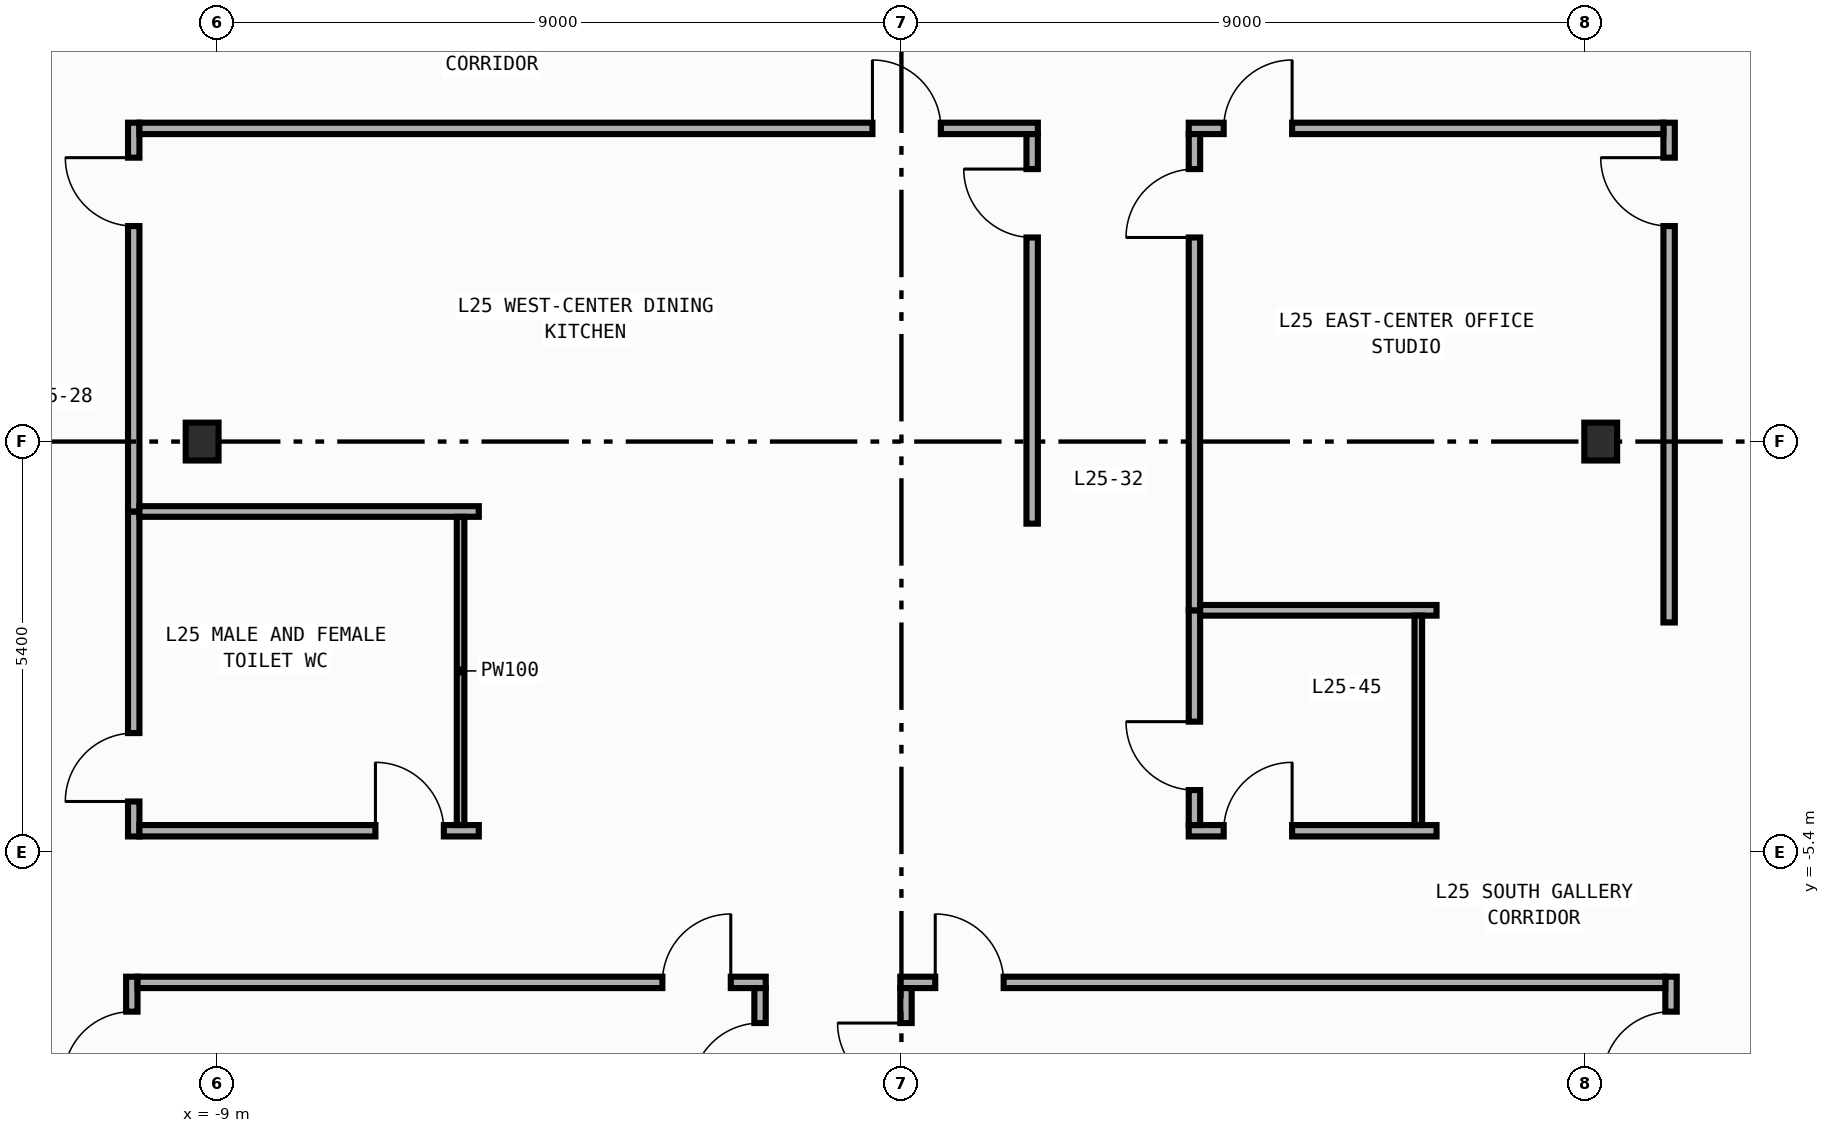
"""IFC4 building model, lengths in metres.
Left out: names, types, materials, properties, quantities, classifications, styles, units other than length and angle.
Written with IfcOpenShell. Run it as: python <this file> out.ifc"""

import sys

from ifc_helpers import new_model, si_unit, direction, frame, frame_2d, origin, origin_2d, place, context, subcontext, project, spatial, rectangle, i_section, extrude, element, fill, save


model = new_model("IFC4")
c1 = context("Model", 3, precision=1e-05, world=origin(), true_north=direction((0.0, 1.0)))
c2 = subcontext(c1, "Body", "Model", "MODEL_VIEW")
j1 = project(units=[si_unit("LENGTHUNIT", "METRE"), si_unit("PLANEANGLEUNIT", "RADIAN")], contexts=[c1])
p1 = place(None, origin())
s1 = spatial("IfcSite", under=j1, at=p1, CompositionType="ELEMENT")
p2 = place(p1, origin())
s2 = spatial("IfcBuilding", under=s1, at=p2, CompositionType="ELEMENT")
p3 = place(p2, frame((0.0, 0.0, 110.0)))
s3 = spatial("IfcBuildingStorey", under=s2, at=p3, CompositionType="ELEMENT", Elevation=110.0)
for number, where, z_axis, x_axis in (
    (1, (-9.2, 0.0, 0.0), (0.0, 0.0, 1.0), (1.0, 0.0, 0.0)),
    (2, (9.2, 0.0, 0.0), (0.0, 0.0, 1.0), (1.0, 0.0, 0.0)),
):
    element("IfcColumn", number, at=place(p3, frame(where, z_axis=z_axis, x_axis=x_axis)), inside=s3, PredefinedType="COLUMN", context=c2, shape_type="SweptSolid", body=[
        extrude(i_section(OverallWidth=0.432, OverallDepth=0.498, WebThickness=0.045, FlangeThickness=0.07, FilletRadius=0.022, at=origin_2d()), origin(), (0.0, 0.0, 1.0), 4.2),
    ])
p4 = place(p3, frame((-10.1, -5.195, 0.0), z_axis=(0.0, 0.0, 1.0), x_axis=(0.0, 1.0, 0.0)))
e3 = element("IfcWall", 3, at=p4, inside=s3, PredefinedType="PARTITIONING", context=c2, shape_type="SweptSolid", body=[
    extrude(rectangle(XDim=4.275, YDim=0.15, at=frame_2d((2.138, 0.0))), origin(), (0.0, 0.0, 1.0), 3.94),
])
p5 = place(p4, frame((0.46, 0.0, 0.0)))
e4 = element("IfcOpeningElement", 4, at=p5, cuts=e3, PredefinedType="OPENING", context=c2, shape_type="SweptSolid", body=[
    extrude(rectangle(XDim=0.9, YDim=2.15, at=frame_2d((0.45, 1.075))), frame((0.0, 0.085, 0.0), z_axis=(0.0, -1.0, 0.0), x_axis=(1.0, 0.0, 0.0)), (0.0, 0.0, 1.0), 0.17),
])
p6 = place(p3, frame((-10.1, -0.92, 0.0), z_axis=(0.0, 0.0, 1.0), x_axis=(0.0, 1.0, 0.0)))
e5 = element("IfcWall", 5, at=p6, inside=s3, PredefinedType="PARTITIONING", context=c2, shape_type="SweptSolid", body=[
    extrude(rectangle(XDim=5.115, YDim=0.15, at=frame_2d((2.558, 0.0))), origin(), (0.0, 0.0, 1.0), 3.94),
])
p7 = place(p6, frame((3.755, 0.0, 0.0)))
e6 = element("IfcOpeningElement", 6, at=p7, cuts=e5, PredefinedType="OPENING", context=c2, shape_type="SweptSolid", body=[
    extrude(rectangle(XDim=0.9, YDim=2.15, at=frame_2d((0.45, 1.075))), frame((0.0, 0.085, 0.0), z_axis=(0.0, -1.0, 0.0), x_axis=(1.0, 0.0, 0.0)), (0.0, 0.0, 1.0), 0.17),
])
p8 = place(p3, frame((-10.125, -12.44, 0.0), z_axis=(0.0, 0.0, 1.0), x_axis=(0.0, 1.0, 0.0)))
e7 = element("IfcWall", 7, at=p8, inside=s3, PredefinedType="PARTITIONING", context=c2, shape_type="SweptSolid", body=[
    extrude(rectangle(XDim=5.4, YDim=0.15, at=frame_2d((2.7, 0.0))), origin(), (0.0, 0.0, 1.0), 3.94),
])
p9 = place(p8, frame((4.04, 0.0, 0.0)))
e8 = element("IfcOpeningElement", 8, at=p9, cuts=e7, PredefinedType="OPENING", context=c2, shape_type="SweptSolid", body=[
    extrude(rectangle(XDim=0.9, YDim=2.15, at=frame_2d((0.45, 1.075))), frame((0.0, 0.085, 0.0), z_axis=(0.0, -1.0, 0.0), x_axis=(1.0, 0.0, 0.0)), (0.0, 0.0, 1.0), 0.17),
])
p10 = place(p3, frame((10.1, -2.38, 0.0), z_axis=(0.0, 0.0, 1.0), x_axis=(0.0, 1.0, 0.0)))
e9 = element("IfcWall", 9, at=p10, inside=s3, PredefinedType="PARTITIONING", context=c2, shape_type="SweptSolid", body=[
    extrude(rectangle(XDim=6.575, YDim=0.15, at=frame_2d((3.288, 0.0))), origin(), (0.0, 0.0, 1.0), 3.94),
])
p11 = place(p10, frame((5.215, 0.0, 0.0)))
e10 = element("IfcOpeningElement", 10, at=p11, cuts=e9, PredefinedType="OPENING", context=c2, shape_type="SweptSolid", body=[
    extrude(rectangle(XDim=0.9, YDim=2.15, at=frame_2d((0.45, 1.075))), frame((0.0, 0.085, 0.0), z_axis=(0.0, -1.0, 0.0), x_axis=(1.0, 0.0, 0.0)), (0.0, 0.0, 1.0), 0.17),
])
p12 = place(p3, frame((10.125, -14.44, 0.0), z_axis=(0.0, 0.0, 1.0), x_axis=(0.0, 1.0, 0.0)))
e11 = element("IfcWall", 11, at=p12, inside=s3, PredefinedType="PARTITIONING", context=c2, shape_type="SweptSolid", body=[
    extrude(rectangle(XDim=7.4, YDim=0.15, at=frame_2d((3.7, 0.0))), origin(), (0.0, 0.0, 1.0), 3.94),
])
p13 = place(p12, frame((6.04, 0.0, 0.0)))
e12 = element("IfcOpeningElement", 12, at=p13, cuts=e11, PredefinedType="OPENING", context=c2, shape_type="SweptSolid", body=[
    extrude(rectangle(XDim=0.9, YDim=2.15, at=frame_2d((0.45, 1.075))), frame((0.0, 0.085, 0.0), z_axis=(0.0, -1.0, 0.0), x_axis=(1.0, 0.0, 0.0)), (0.0, 0.0, 1.0), 0.17),
])
p14 = place(p3, frame((3.78, 4.12, 0.0), z_axis=(0.0, 0.0, 1.0), x_axis=(1.0, 0.0, 0.0)))
e13 = element("IfcWall", 13, at=p14, inside=s3, PredefinedType="PARTITIONING", context=c2, shape_type="SweptSolid", body=[
    extrude(rectangle(XDim=6.245, YDim=0.15, at=frame_2d((3.123, 0.0))), origin(), (0.0, 0.0, 1.0), 3.94),
])
p15 = place(p14, frame((0.46, 0.0, 0.0)))
e14 = element("IfcOpeningElement", 14, at=p15, cuts=e13, PredefinedType="OPENING", context=c2, shape_type="SweptSolid", body=[
    extrude(rectangle(XDim=0.9, YDim=2.15, at=frame_2d((0.45, 1.075))), frame((0.0, 0.085, 0.0), z_axis=(0.0, -1.0, 0.0), x_axis=(1.0, 0.0, 0.0)), (0.0, 0.0, 1.0), 0.17),
])
p16 = place(p3, frame((-10.025, 4.12, 0.0), z_axis=(0.0, 0.0, 1.0), x_axis=(1.0, 0.0, 0.0)))
e15 = element("IfcWall", 15, at=p16, inside=s3, PredefinedType="PARTITIONING", context=c2, shape_type="SweptSolid", body=[
    extrude(rectangle(XDim=11.82, YDim=0.15, at=frame_2d((5.91, 0.0))), origin(), (0.0, 0.0, 1.0), 3.94),
])
p17 = place(p16, frame((9.644, 0.0, 0.0)))
e16 = element("IfcOpeningElement", 16, at=p17, cuts=e15, PredefinedType="OPENING", context=c2, shape_type="SweptSolid", body=[
    extrude(rectangle(XDim=0.9, YDim=2.15, at=frame_2d((0.45, 1.075))), frame((0.0, 0.085, 0.0), z_axis=(0.0, -1.0, 0.0), x_axis=(1.0, 0.0, 0.0)), (0.0, 0.0, 1.0), 0.17),
])
p18 = place(p3, frame((3.78, -5.12, 0.0), z_axis=(0.0, 0.0, 1.0), x_axis=(1.0, 0.0, 0.0)))
e17 = element("IfcWall", 17, at=p18, inside=s3, PredefinedType="PARTITIONING", context=c2, shape_type="SweptSolid", body=[
    extrude(rectangle(XDim=3.26, YDim=0.15, at=frame_2d((1.63, 0.0))), origin(), (0.0, 0.0, 1.0), 3.94),
])
p19 = place(p18, frame((0.46, 0.0, 0.0)))
e18 = element("IfcOpeningElement", 18, at=p19, cuts=e17, PredefinedType="OPENING", context=c2, shape_type="SweptSolid", body=[
    extrude(rectangle(XDim=0.9, YDim=2.15, at=frame_2d((0.45, 1.075))), frame((0.0, 0.085, 0.0), z_axis=(0.0, -1.0, 0.0), x_axis=(1.0, 0.0, 0.0)), (0.0, 0.0, 1.0), 0.17),
])
p20 = place(p3, frame((-10.025, -5.12, 0.0), z_axis=(0.0, 0.0, 1.0), x_axis=(1.0, 0.0, 0.0)))
e19 = element("IfcWall", 19, at=p20, inside=s3, PredefinedType="PARTITIONING", context=c2, shape_type="SweptSolid", body=[
    extrude(rectangle(XDim=4.465, YDim=0.15, at=frame_2d((2.232, 0.0))), origin(), (0.0, 0.0, 1.0), 3.94),
])
p21 = place(p20, frame((3.105, 0.0, 0.0)))
e20 = element("IfcOpeningElement", 20, at=p21, cuts=e19, PredefinedType="OPENING", context=c2, shape_type="SweptSolid", body=[
    extrude(rectangle(XDim=0.9, YDim=2.15, at=frame_2d((0.45, 1.075))), frame((0.0, 0.085, 0.0), z_axis=(0.0, -1.0, 0.0), x_axis=(1.0, 0.0, 0.0)), (0.0, 0.0, 1.0), 0.17),
])
p22 = place(p3, frame((-10.05, -7.115, 0.0), z_axis=(0.0, 0.0, 1.0), x_axis=(1.0, 0.0, 0.0)))
e21 = element("IfcWall", 21, at=p22, inside=s3, PredefinedType="PARTITIONING", context=c2, shape_type="SweptSolid", body=[
    extrude(rectangle(XDim=8.265, YDim=0.15, at=frame_2d((4.133, 0.0))), origin(), (0.0, 0.0, 1.0), 3.94),
])
p23 = place(p22, frame((6.905, 0.0, 0.0)))
e22 = element("IfcOpeningElement", 22, at=p23, cuts=e21, PredefinedType="OPENING", context=c2, shape_type="SweptSolid", body=[
    extrude(rectangle(XDim=0.9, YDim=2.15, at=frame_2d((0.45, 1.075))), frame((0.0, 0.085, 0.0), z_axis=(0.0, -1.0, 0.0), x_axis=(1.0, 0.0, 0.0)), (0.0, 0.0, 1.0), 0.17),
])
p24 = place(p3, frame((-0.015, -7.115, 0.0), z_axis=(0.0, 0.0, 1.0), x_axis=(1.0, 0.0, 0.0)))
e23 = element("IfcWall", 23, at=p24, inside=s3, PredefinedType="PARTITIONING", context=c2, shape_type="SweptSolid", body=[
    extrude(rectangle(XDim=10.065, YDim=0.15, at=frame_2d((5.032, 0.0))), origin(), (0.0, 0.0, 1.0), 3.94),
])
p25 = place(p24, frame((0.46, 0.0, 0.0)))
e24 = element("IfcOpeningElement", 24, at=p25, cuts=e23, PredefinedType="OPENING", context=c2, shape_type="SweptSolid", body=[
    extrude(rectangle(XDim=0.9, YDim=2.15, at=frame_2d((0.45, 1.075))), frame((0.0, 0.085, 0.0), z_axis=(0.0, -1.0, 0.0), x_axis=(1.0, 0.0, 0.0)), (0.0, 0.0, 1.0), 0.17),
])
p26 = place(p3, frame((3.855, -5.045, 0.0), z_axis=(0.0, 0.0, 1.0), x_axis=(0.0, 1.0, 0.0)))
e25 = element("IfcWall", 25, at=p26, inside=s3, PredefinedType="PARTITIONING", context=c2, shape_type="SweptSolid", body=[
    extrude(rectangle(XDim=2.825, YDim=0.15, at=frame_2d((1.413, 0.0))), origin(), (0.0, 0.0, 1.0), 3.94),
])
p27 = place(p26, frame((0.46, 0.0, 0.0)))
e26 = element("IfcOpeningElement", 26, at=p27, cuts=e25, PredefinedType="OPENING", context=c2, shape_type="SweptSolid", body=[
    extrude(rectangle(XDim=0.9, YDim=2.15, at=frame_2d((0.45, 1.075))), frame((0.0, 0.085, 0.0), z_axis=(0.0, -1.0, 0.0), x_axis=(1.0, 0.0, 0.0)), (0.0, 0.0, 1.0), 0.17),
])
p28 = place(p3, frame((3.855, -2.22, 0.0), z_axis=(0.0, 0.0, 1.0), x_axis=(0.0, 1.0, 0.0)))
e27 = element("IfcWall", 27, at=p28, inside=s3, PredefinedType="PARTITIONING", context=c2, shape_type="SweptSolid", body=[
    extrude(rectangle(XDim=6.265, YDim=0.15, at=frame_2d((3.132, 0.0))), origin(), (0.0, 0.0, 1.0), 3.94),
])
p29 = place(p28, frame((4.905, 0.0, 0.0)))
e28 = element("IfcOpeningElement", 28, at=p29, cuts=e27, PredefinedType="OPENING", context=c2, shape_type="SweptSolid", body=[
    extrude(rectangle(XDim=0.9, YDim=2.15, at=frame_2d((0.45, 1.075))), frame((0.0, 0.085, 0.0), z_axis=(0.0, -1.0, 0.0), x_axis=(1.0, 0.0, 0.0)), (0.0, 0.0, 1.0), 0.17),
])
p30 = place(p3, frame((1.72, -1.08, 0.0), z_axis=(0.0, 0.0, 1.0), x_axis=(0.0, 1.0, 0.0)))
e29 = element("IfcWall", 29, at=p30, inside=s3, PredefinedType="PARTITIONING", context=c2, shape_type="SweptSolid", body=[
    extrude(rectangle(XDim=5.125, YDim=0.15, at=frame_2d((2.562, 0.0))), origin(), (0.0, 0.0, 1.0), 3.94),
])
p31 = place(p30, frame((3.765, 0.0, 0.0)))
e30 = element("IfcOpeningElement", 30, at=p31, cuts=e29, PredefinedType="OPENING", context=c2, shape_type="SweptSolid", body=[
    extrude(rectangle(XDim=0.9, YDim=2.15, at=frame_2d((0.45, 1.075))), frame((0.0, 0.085, 0.0), z_axis=(0.0, -1.0, 0.0), x_axis=(1.0, 0.0, 0.0)), (0.0, 0.0, 1.0), 0.17),
])
p32 = place(p3, frame((-1.86, -14.865, 0.0), z_axis=(0.0, 0.0, 1.0), x_axis=(0.0, 1.0, 0.0)))
e31 = element("IfcWall", 31, at=p32, inside=s3, PredefinedType="PARTITIONING", context=c2, shape_type="SweptSolid", body=[
    extrude(rectangle(XDim=7.675, YDim=0.15, at=frame_2d((3.837, 0.0))), origin(), (0.0, 0.0, 1.0), 3.94),
])
p33 = place(p32, frame((6.315, 0.0, 0.0)))
e32 = element("IfcOpeningElement", 32, at=p33, cuts=e31, PredefinedType="OPENING", context=c2, shape_type="SweptSolid", body=[
    extrude(rectangle(XDim=0.9, YDim=2.15, at=frame_2d((0.45, 1.075))), frame((0.0, 0.085, 0.0), z_axis=(0.0, -1.0, 0.0), x_axis=(1.0, 0.0, 0.0)), (0.0, 0.0, 1.0), 0.17),
])
p34 = place(p3, frame((0.06, -14.865, 0.0), z_axis=(0.0, 0.0, 1.0), x_axis=(0.0, 1.0, 0.0)))
e33 = element("IfcWall", 33, at=p34, inside=s3, PredefinedType="PARTITIONING", context=c2, shape_type="SweptSolid", body=[
    extrude(rectangle(XDim=7.675, YDim=0.15, at=frame_2d((3.837, 0.0))), origin(), (0.0, 0.0, 1.0), 3.94),
])
p35 = place(p34, frame((6.315, 0.0, 0.0)))
e34 = element("IfcOpeningElement", 34, at=p35, cuts=e33, PredefinedType="OPENING", context=c2, shape_type="SweptSolid", body=[
    extrude(rectangle(XDim=0.9, YDim=2.15, at=frame_2d((0.45, 1.075))), frame((0.0, 0.085, 0.0), z_axis=(0.0, -1.0, 0.0), x_axis=(1.0, 0.0, 0.0)), (0.0, 0.0, 1.0), 0.17),
])
p36 = place(p3, frame((3.93, -2.22, 0.0), z_axis=(0.0, 0.0, 1.0), x_axis=(1.0, 0.0, 0.0)))
e35 = element("IfcWall", 35, at=p36, inside=s3, PredefinedType="PARTITIONING", context=c2, shape_type="SweptSolid", body=[
    extrude(rectangle(XDim=3.11, YDim=0.14, at=frame_2d((1.555, 0.0))), origin(), (0.0, 0.0, 1.0), 3.94),
])
p37 = place(p3, frame((-10.025, -0.92, 0.0), z_axis=(0.0, 0.0, 1.0), x_axis=(1.0, 0.0, 0.0)))
e36 = element("IfcWall", 36, at=p37, inside=s3, PredefinedType="PARTITIONING", context=c2, shape_type="SweptSolid", body=[
    extrude(rectangle(XDim=4.465, YDim=0.14, at=frame_2d((2.232, 0.0))), origin(), (0.0, 0.0, 1.0), 3.94),
])
p38 = place(p3, frame((6.8, -2.29, 0.0), z_axis=(0.0, 0.0, 1.0), x_axis=(0.0, -1.0, 0.0)))
e37 = element("IfcWall", 37, at=p38, inside=s3, PredefinedType="PARTITIONING", context=c2, shape_type="SweptSolid", body=[
    extrude(rectangle(XDim=2.755, YDim=0.1, at=frame_2d((1.377, 0.0))), origin(), (0.0, 0.0, 1.0), 3.94),
])
p39 = place(p3, frame((-5.8, -0.99, 0.0), z_axis=(0.0, 0.0, 1.0), x_axis=(0.0, -1.0, 0.0)))
e38 = element("IfcWall", 38, at=p39, inside=s3, PredefinedType="PARTITIONING", context=c2, shape_type="SweptSolid", body=[
    extrude(rectangle(XDim=4.055, YDim=0.1, at=frame_2d((2.027, 0.0))), origin(), (0.0, 0.0, 1.0), 3.94),
])
p40 = place(p5, origin())
e39 = element("IfcDoor", 39, at=p40, inside=s3, OperationType="SINGLE_SWING_LEFT", PredefinedType="DOOR", context=c2, shape_type="SweptSolid", body=[
    extrude(rectangle(XDim=0.9, YDim=2.15, at=frame_2d((0.45, 1.075))), frame((0.0, 0.025, 0.0), z_axis=(0.0, -1.0, 0.0), x_axis=(1.0, 0.0, 0.0)), (0.0, 0.0, 1.0), 0.05),
])
fill(e4, e39)
p41 = place(p7, origin())
e40 = element("IfcDoor", 40, at=p41, inside=s3, OperationType="SINGLE_SWING_RIGHT", PredefinedType="DOOR", context=c2, shape_type="SweptSolid", body=[
    extrude(rectangle(XDim=0.9, YDim=2.15, at=frame_2d((0.45, 1.075))), frame((0.0, 0.025, 0.0), z_axis=(0.0, -1.0, 0.0), x_axis=(1.0, 0.0, 0.0)), (0.0, 0.0, 1.0), 0.05),
])
fill(e6, e40)
p42 = place(p9, origin())
e41 = element("IfcDoor", 41, at=p42, inside=s3, OperationType="SINGLE_SWING_LEFT", PredefinedType="DOOR", context=c2, shape_type="SweptSolid", body=[
    extrude(rectangle(XDim=0.9, YDim=2.15, at=frame_2d((0.45, 1.075))), frame((0.0, 0.025, 0.0), z_axis=(0.0, -1.0, 0.0), x_axis=(1.0, 0.0, 0.0)), (0.0, 0.0, 1.0), 0.05),
])
fill(e8, e41)
p43 = place(p11, origin())
e42 = element("IfcDoor", 42, at=p43, inside=s3, OperationType="SINGLE_SWING_RIGHT", PredefinedType="DOOR", context=c2, shape_type="SweptSolid", body=[
    extrude(rectangle(XDim=0.9, YDim=2.15, at=frame_2d((0.45, 1.075))), frame((0.0, 0.025, 0.0), z_axis=(0.0, -1.0, 0.0), x_axis=(1.0, 0.0, 0.0)), (0.0, 0.0, 1.0), 0.05),
])
fill(e10, e42)
p44 = place(p13, origin())
e43 = element("IfcDoor", 43, at=p44, inside=s3, OperationType="SINGLE_SWING_LEFT", PredefinedType="DOOR", context=c2, shape_type="SweptSolid", body=[
    extrude(rectangle(XDim=0.9, YDim=2.15, at=frame_2d((0.45, 1.075))), frame((0.0, 0.025, 0.0), z_axis=(0.0, -1.0, 0.0), x_axis=(1.0, 0.0, 0.0)), (0.0, 0.0, 1.0), 0.05),
])
fill(e12, e43)
p45 = place(p15, origin())
e44 = element("IfcDoor", 44, at=p45, inside=s3, OperationType="SINGLE_SWING_RIGHT", PredefinedType="DOOR", context=c2, shape_type="SweptSolid", body=[
    extrude(rectangle(XDim=0.9, YDim=2.15, at=frame_2d((0.45, 1.075))), frame((0.0, 0.025, 0.0), z_axis=(0.0, -1.0, 0.0), x_axis=(1.0, 0.0, 0.0)), (0.0, 0.0, 1.0), 0.05),
])
fill(e14, e44)
p46 = place(p17, origin())
e45 = element("IfcDoor", 45, at=p46, inside=s3, OperationType="SINGLE_SWING_LEFT", PredefinedType="DOOR", context=c2, shape_type="SweptSolid", body=[
    extrude(rectangle(XDim=0.9, YDim=2.15, at=frame_2d((0.45, 1.075))), frame((0.0, 0.025, 0.0), z_axis=(0.0, -1.0, 0.0), x_axis=(1.0, 0.0, 0.0)), (0.0, 0.0, 1.0), 0.05),
])
fill(e16, e45)
p47 = place(p19, origin())
e46 = element("IfcDoor", 46, at=p47, inside=s3, OperationType="SINGLE_SWING_RIGHT", PredefinedType="DOOR", context=c2, shape_type="SweptSolid", body=[
    extrude(rectangle(XDim=0.9, YDim=2.15, at=frame_2d((0.45, 1.075))), frame((0.0, 0.025, 0.0), z_axis=(0.0, -1.0, 0.0), x_axis=(1.0, 0.0, 0.0)), (0.0, 0.0, 1.0), 0.05),
])
fill(e18, e46)
p48 = place(p21, origin())
e47 = element("IfcDoor", 47, at=p48, inside=s3, OperationType="SINGLE_SWING_LEFT", PredefinedType="DOOR", context=c2, shape_type="SweptSolid", body=[
    extrude(rectangle(XDim=0.9, YDim=2.15, at=frame_2d((0.45, 1.075))), frame((0.0, 0.025, 0.0), z_axis=(0.0, -1.0, 0.0), x_axis=(1.0, 0.0, 0.0)), (0.0, 0.0, 1.0), 0.05),
])
fill(e20, e47)
p49 = place(p23, origin())
e48 = element("IfcDoor", 48, at=p49, inside=s3, OperationType="SINGLE_SWING_RIGHT", PredefinedType="DOOR", context=c2, shape_type="SweptSolid", body=[
    extrude(rectangle(XDim=0.9, YDim=2.15, at=frame_2d((0.45, 1.075))), frame((0.0, 0.025, 0.0), z_axis=(0.0, -1.0, 0.0), x_axis=(1.0, 0.0, 0.0)), (0.0, 0.0, 1.0), 0.05),
])
fill(e22, e48)
p50 = place(p25, origin())
e49 = element("IfcDoor", 49, at=p50, inside=s3, OperationType="SINGLE_SWING_LEFT", PredefinedType="DOOR", context=c2, shape_type="SweptSolid", body=[
    extrude(rectangle(XDim=0.9, YDim=2.15, at=frame_2d((0.45, 1.075))), frame((0.0, 0.025, 0.0), z_axis=(0.0, -1.0, 0.0), x_axis=(1.0, 0.0, 0.0)), (0.0, 0.0, 1.0), 0.05),
])
fill(e24, e49)
p51 = place(p27, origin())
e50 = element("IfcDoor", 50, at=p51, inside=s3, OperationType="SINGLE_SWING_RIGHT", PredefinedType="DOOR", context=c2, shape_type="SweptSolid", body=[
    extrude(rectangle(XDim=0.9, YDim=2.15, at=frame_2d((0.45, 1.075))), frame((0.0, 0.025, 0.0), z_axis=(0.0, -1.0, 0.0), x_axis=(1.0, 0.0, 0.0)), (0.0, 0.0, 1.0), 0.05),
])
fill(e26, e50)
p52 = place(p29, origin())
e51 = element("IfcDoor", 51, at=p52, inside=s3, OperationType="SINGLE_SWING_LEFT", PredefinedType="DOOR", context=c2, shape_type="SweptSolid", body=[
    extrude(rectangle(XDim=0.9, YDim=2.15, at=frame_2d((0.45, 1.075))), frame((0.0, 0.025, 0.0), z_axis=(0.0, -1.0, 0.0), x_axis=(1.0, 0.0, 0.0)), (0.0, 0.0, 1.0), 0.05),
])
fill(e28, e51)
p53 = place(p31, origin())
e52 = element("IfcDoor", 52, at=p53, inside=s3, OperationType="SINGLE_SWING_RIGHT", PredefinedType="DOOR", context=c2, shape_type="SweptSolid", body=[
    extrude(rectangle(XDim=0.9, YDim=2.15, at=frame_2d((0.45, 1.075))), frame((0.0, 0.025, 0.0), z_axis=(0.0, -1.0, 0.0), x_axis=(1.0, 0.0, 0.0)), (0.0, 0.0, 1.0), 0.05),
])
fill(e30, e52)
p54 = place(p33, origin())
e53 = element("IfcDoor", 53, at=p54, inside=s3, OperationType="SINGLE_SWING_LEFT", PredefinedType="DOOR", context=c2, shape_type="SweptSolid", body=[
    extrude(rectangle(XDim=0.9, YDim=2.15, at=frame_2d((0.45, 1.075))), frame((0.0, 0.025, 0.0), z_axis=(0.0, -1.0, 0.0), x_axis=(1.0, 0.0, 0.0)), (0.0, 0.0, 1.0), 0.05),
])
fill(e32, e53)
p55 = place(p35, origin())
e54 = element("IfcDoor", 54, at=p55, inside=s3, OperationType="SINGLE_SWING_RIGHT", PredefinedType="DOOR", context=c2, shape_type="SweptSolid", body=[
    extrude(rectangle(XDim=0.9, YDim=2.15, at=frame_2d((0.45, 1.075))), frame((0.0, 0.025, 0.0), z_axis=(0.0, -1.0, 0.0), x_axis=(1.0, 0.0, 0.0)), (0.0, 0.0, 1.0), 0.05),
])
fill(e34, e54)
save(model, sys.argv[1])
